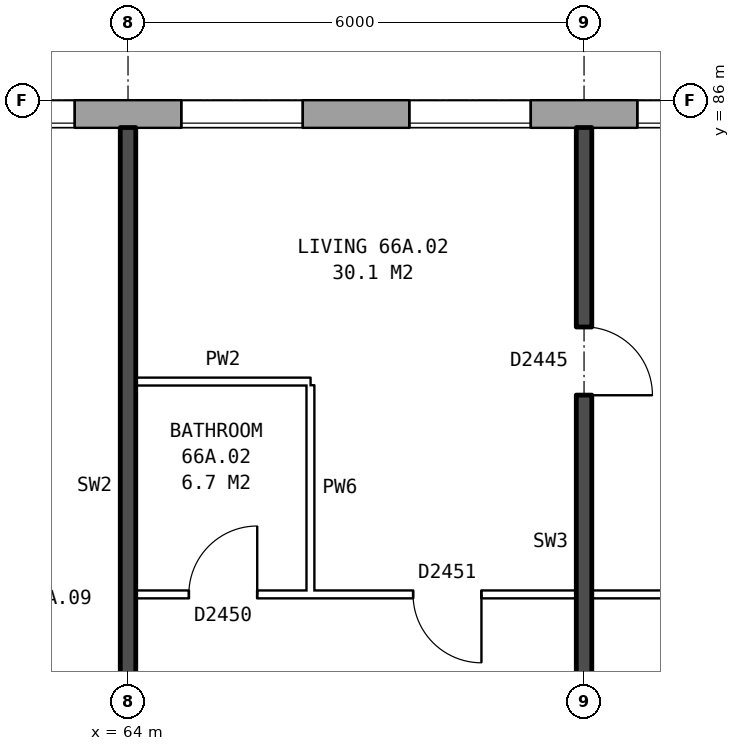
"""IFC4 building model, lengths in metres.
Left out: names, types, materials, properties, quantities, classifications, styles, units other than length and angle.
Written with IfcOpenShell. Run it as: python <this file> out.ifc"""

import sys

from ifc_helpers import new_model, si_unit, direction, frame, frame_2d, origin, place, context, subcontext, project, spatial, rectangle, extrude, element, fill, save


model = new_model("IFC4")
c1 = context("Model", 3, precision=1e-05, world=origin(), true_north=direction((0.0, 1.0)))
c2 = subcontext(c1, "Body", "Model", "MODEL_VIEW")
j1 = project(units=[si_unit("LENGTHUNIT", "METRE"), si_unit("PLANEANGLEUNIT", "RADIAN")], contexts=[c1])
p1 = place(None, origin())
s1 = spatial("IfcSite", under=j1, at=p1, CompositionType="ELEMENT")
p2 = place(p1, origin())
s2 = spatial("IfcBuilding", under=s1, at=p2, CompositionType="ELEMENT")
p3 = place(p2, frame((0.0, 0.0, 233.8)))
s3 = spatial("IfcBuildingStorey", under=s2, at=p3, CompositionType="ELEMENT", Elevation=233.8)
p4 = place(p3, frame((74.95, 85.82, 0.0), z_axis=(0.0, 0.0, 1.0), x_axis=(-1.0, 0.0, 0.0)))
e1 = element("IfcWall", 1, at=p4, inside=s3, PredefinedType="STANDARD", context=c2, shape_type="SweptSolid", body=[
    extrude(rectangle(XDim=39.875, YDim=0.36, at=frame_2d((19.938, 0.0))), origin(), (0.0, 0.0, 1.0), 2.85),
])
p5 = place(p4, frame((2.65, 0.0, 0.8)))
e2 = element("IfcOpeningElement", 2, at=p5, cuts=e1, PredefinedType="OPENING", context=c2, shape_type="SweptSolid", body=[
    extrude(rectangle(XDim=1.6, YDim=1.8, at=frame_2d((0.8, 0.9))), frame((0.0, 0.19, 0.0), z_axis=(0.0, -1.0, 0.0), x_axis=(1.0, 0.0, 0.0)), (0.0, 0.0, 1.0), 0.38),
])
p6 = place(p4, frame((5.65, 0.0, 0.8)))
e3 = element("IfcOpeningElement", 3, at=p6, cuts=e1, PredefinedType="OPENING", context=c2, shape_type="SweptSolid", body=[
    extrude(rectangle(XDim=1.6, YDim=1.8, at=frame_2d((0.8, 0.9))), frame((0.0, 0.19, 0.0), z_axis=(0.0, -1.0, 0.0), x_axis=(1.0, 0.0, 0.0)), (0.0, 0.0, 1.0), 0.38),
])
p7 = place(p4, frame((8.65, 0.0, 0.8)))
e4 = element("IfcOpeningElement", 4, at=p7, cuts=e1, PredefinedType="OPENING", context=c2, shape_type="SweptSolid", body=[
    extrude(rectangle(XDim=1.6, YDim=1.8, at=frame_2d((0.8, 0.9))), frame((0.0, 0.19, 0.0), z_axis=(0.0, -1.0, 0.0), x_axis=(1.0, 0.0, 0.0)), (0.0, 0.0, 1.0), 0.38),
])
p8 = place(p4, frame((11.65, 0.0, 0.8)))
e5 = element("IfcOpeningElement", 5, at=p8, cuts=e1, PredefinedType="OPENING", context=c2, shape_type="SweptSolid", body=[
    extrude(rectangle(XDim=1.6, YDim=1.8, at=frame_2d((0.8, 0.9))), frame((0.0, 0.19, 0.0), z_axis=(0.0, -1.0, 0.0), x_axis=(1.0, 0.0, 0.0)), (0.0, 0.0, 1.0), 0.38),
])
p9 = place(p4, frame((14.65, 0.0, 0.8)))
e6 = element("IfcOpeningElement", 6, at=p9, cuts=e1, PredefinedType="OPENING", context=c2, shape_type="SweptSolid", body=[
    extrude(rectangle(XDim=1.6, YDim=1.8, at=frame_2d((0.8, 0.9))), frame((0.0, 0.19, 0.0), z_axis=(0.0, -1.0, 0.0), x_axis=(1.0, 0.0, 0.0)), (0.0, 0.0, 1.0), 0.38),
])
p10 = place(p4, frame((17.65, 0.0, 0.8)))
e7 = element("IfcOpeningElement", 7, at=p10, cuts=e1, PredefinedType="OPENING", context=c2, shape_type="SweptSolid", body=[
    extrude(rectangle(XDim=1.6, YDim=1.8, at=frame_2d((0.8, 0.9))), frame((0.0, 0.19, 0.0), z_axis=(0.0, -1.0, 0.0), x_axis=(1.0, 0.0, 0.0)), (0.0, 0.0, 1.0), 0.38),
])
p11 = place(p4, frame((20.5, 0.0, 0.15)))
e8 = element("IfcOpeningElement", 8, at=p11, cuts=e1, PredefinedType="OPENING", context=c2, shape_type="SweptSolid", body=[
    extrude(rectangle(XDim=0.8, YDim=0.9, at=frame_2d((0.4, 0.45))), frame((0.0, 0.19, 0.0), z_axis=(0.0, -1.0, 0.0), x_axis=(1.0, 0.0, 0.0)), (0.0, 0.0, 1.0), 0.38),
])
p12 = place(p4, frame((23.65, 0.0, 0.8)))
e9 = element("IfcOpeningElement", 9, at=p12, cuts=e1, PredefinedType="OPENING", context=c2, shape_type="SweptSolid", body=[
    extrude(rectangle(XDim=1.6, YDim=1.8, at=frame_2d((0.8, 0.9))), frame((0.0, 0.19, 0.0), z_axis=(0.0, -1.0, 0.0), x_axis=(1.0, 0.0, 0.0)), (0.0, 0.0, 1.0), 0.38),
])
p13 = place(p4, frame((26.65, 0.0, 0.8)))
e10 = element("IfcOpeningElement", 10, at=p13, cuts=e1, PredefinedType="OPENING", context=c2, shape_type="SweptSolid", body=[
    extrude(rectangle(XDim=1.6, YDim=1.8, at=frame_2d((0.8, 0.9))), frame((0.0, 0.19, 0.0), z_axis=(0.0, -1.0, 0.0), x_axis=(1.0, 0.0, 0.0)), (0.0, 0.0, 1.0), 0.38),
])
p14 = place(p4, frame((29.65, 0.0, 0.8)))
e11 = element("IfcOpeningElement", 11, at=p14, cuts=e1, PredefinedType="OPENING", context=c2, shape_type="SweptSolid", body=[
    extrude(rectangle(XDim=1.6, YDim=1.8, at=frame_2d((0.8, 0.9))), frame((0.0, 0.19, 0.0), z_axis=(0.0, -1.0, 0.0), x_axis=(1.0, 0.0, 0.0)), (0.0, 0.0, 1.0), 0.38),
])
p15 = place(p4, frame((32.65, 0.0, 0.8)))
e12 = element("IfcOpeningElement", 12, at=p15, cuts=e1, PredefinedType="OPENING", context=c2, shape_type="SweptSolid", body=[
    extrude(rectangle(XDim=1.6, YDim=1.8, at=frame_2d((0.8, 0.9))), frame((0.0, 0.19, 0.0), z_axis=(0.0, -1.0, 0.0), x_axis=(1.0, 0.0, 0.0)), (0.0, 0.0, 1.0), 0.38),
])
p16 = place(p4, frame((35.65, 0.0, 0.8)))
e13 = element("IfcOpeningElement", 13, at=p16, cuts=e1, PredefinedType="OPENING", context=c2, shape_type="SweptSolid", body=[
    extrude(rectangle(XDim=1.6, YDim=1.8, at=frame_2d((0.8, 0.9))), frame((0.0, 0.19, 0.0), z_axis=(0.0, -1.0, 0.0), x_axis=(1.0, 0.0, 0.0)), (0.0, 0.0, 1.0), 0.38),
])
p17 = place(p3, frame((64.1, 79.5, 0.0), z_axis=(0.0, 0.0, 1.0), x_axis=(1.0, 0.0, 0.0)))
e14 = element("IfcWall", 14, at=p17, inside=s3, PredefinedType="PARTITIONING", context=c2, shape_type="SweptSolid", body=[
    extrude(rectangle(XDim=11.8, YDim=0.1, at=frame_2d((5.9, 0.0))), origin(), (0.0, 0.0, 1.0), 2.85),
])
p18 = place(p17, frame((3.65, 0.0, 0.0)))
e15 = element("IfcOpeningElement", 15, at=p18, cuts=e14, PredefinedType="OPENING", context=c2, shape_type="SweptSolid", body=[
    extrude(rectangle(XDim=0.9, YDim=2.1, at=frame_2d((0.45, 1.05))), frame((0.0, 0.06, 0.0), z_axis=(0.0, -1.0, 0.0), x_axis=(1.0, 0.0, 0.0)), (0.0, 0.0, 1.0), 0.12),
])
p19 = place(p17, frame((0.7, 0.0, 0.0)))
e16 = element("IfcOpeningElement", 16, at=p19, cuts=e14, PredefinedType="OPENING", context=c2, shape_type="SweptSolid", body=[
    extrude(rectangle(XDim=0.9, YDim=2.1, at=frame_2d((0.45, 1.05))), frame((0.0, 0.06, 0.0), z_axis=(0.0, -1.0, 0.0), x_axis=(1.0, 0.0, 0.0)), (0.0, 0.0, 1.0), 0.12),
])
p20 = place(p3, frame((64.1, 82.3, 0.0), z_axis=(0.0, 0.0, 1.0), x_axis=(1.0, 0.0, 0.0)))
e17 = element("IfcWall", 17, at=p20, inside=s3, PredefinedType="PARTITIONING", context=c2, shape_type="SweptSolid", body=[
    extrude(rectangle(XDim=2.3, YDim=0.1, at=frame_2d((1.15, 0.0))), origin(), (0.0, 0.0, 1.0), 2.85),
])
p21 = place(p3, frame((64.0, 76.2, 0.0), z_axis=(0.0, 0.0, 1.0), x_axis=(0.0, 1.0, 0.0)))
e18 = element("IfcWall", 18, at=p21, inside=s3, PredefinedType="SOLIDWALL", context=c2, shape_type="SweptSolid", body=[
    extrude(rectangle(XDim=9.44, YDim=0.2, at=frame_2d((4.72, 0.0))), origin(), (0.0, 0.0, 1.0), 2.85),
])
p22 = place(p3, frame((66.4, 79.55, 0.0), z_axis=(0.0, 0.0, 1.0), x_axis=(0.0, 1.0, 0.0)))
e19 = element("IfcWall", 19, at=p22, inside=s3, PredefinedType="PARTITIONING", context=c2, shape_type="SweptSolid", body=[
    extrude(rectangle(XDim=2.7, YDim=0.1, at=frame_2d((1.35, 0.0))), origin(), (0.0, 0.0, 1.0), 2.85),
])
p23 = place(p3, frame((70.0, 76.2, 0.0), z_axis=(0.0, 0.0, 1.0), x_axis=(0.0, 1.0, 0.0)))
e20 = element("IfcWall", 20, at=p23, inside=s3, PredefinedType="SOLIDWALL", context=c2, shape_type="SweptSolid", body=[
    extrude(rectangle(XDim=9.44, YDim=0.2, at=frame_2d((4.72, 0.0))), origin(), (0.0, 0.0, 1.0), 2.85),
])
p24 = place(p23, frame((5.92, 0.0, 0.0)))
e21 = element("IfcOpeningElement", 21, at=p24, cuts=e20, PredefinedType="OPENING", context=c2, shape_type="SweptSolid", body=[
    extrude(rectangle(XDim=0.9, YDim=2.1, at=frame_2d((0.45, 1.05))), frame((0.0, 0.11, 0.0), z_axis=(0.0, -1.0, 0.0), x_axis=(1.0, 0.0, 0.0)), (0.0, 0.0, 1.0), 0.22),
])
p25 = place(p23, frame((1.25, 0.0, 0.0)))
e22 = element("IfcOpeningElement", 22, at=p25, cuts=e20, PredefinedType="OPENING", context=c2, shape_type="SweptSolid", body=[
    extrude(rectangle(XDim=0.8, YDim=2.1, at=frame_2d((0.4, 1.05))), frame((0.0, 0.11, 0.0), z_axis=(0.0, -1.0, 0.0), x_axis=(1.0, 0.0, 0.0)), (0.0, 0.0, 1.0), 0.22),
])
p26 = place(p5, origin())
e23 = element("IfcWindow", 23, at=p26, inside=s3, PartitioningType="SINGLE_PANEL", PredefinedType="WINDOW", context=c2, shape_type="SweptSolid", body=[
    extrude(rectangle(XDim=1.6, YDim=1.8, at=frame_2d((0.8, 0.9))), frame((0.0, 0.15, 0.0), z_axis=(0.0, -1.0, 0.0), x_axis=(1.0, 0.0, 0.0)), (0.0, 0.0, 1.0), 0.06),
])
fill(e2, e23)
p27 = place(p6, origin())
e24 = element("IfcWindow", 24, at=p27, inside=s3, PartitioningType="SINGLE_PANEL", PredefinedType="WINDOW", context=c2, shape_type="SweptSolid", body=[
    extrude(rectangle(XDim=1.6, YDim=1.8, at=frame_2d((0.8, 0.9))), frame((0.0, 0.15, 0.0), z_axis=(0.0, -1.0, 0.0), x_axis=(1.0, 0.0, 0.0)), (0.0, 0.0, 1.0), 0.06),
])
fill(e3, e24)
p28 = place(p7, origin())
e25 = element("IfcWindow", 25, at=p28, inside=s3, PartitioningType="SINGLE_PANEL", PredefinedType="WINDOW", context=c2, shape_type="SweptSolid", body=[
    extrude(rectangle(XDim=1.6, YDim=1.8, at=frame_2d((0.8, 0.9))), frame((0.0, 0.15, 0.0), z_axis=(0.0, -1.0, 0.0), x_axis=(1.0, 0.0, 0.0)), (0.0, 0.0, 1.0), 0.06),
])
fill(e4, e25)
p29 = place(p8, origin())
e26 = element("IfcWindow", 26, at=p29, inside=s3, PartitioningType="SINGLE_PANEL", PredefinedType="WINDOW", context=c2, shape_type="SweptSolid", body=[
    extrude(rectangle(XDim=1.6, YDim=1.8, at=frame_2d((0.8, 0.9))), frame((0.0, 0.15, 0.0), z_axis=(0.0, -1.0, 0.0), x_axis=(1.0, 0.0, 0.0)), (0.0, 0.0, 1.0), 0.06),
])
fill(e5, e26)
p30 = place(p24, frame((0.9, 0.0, 0.0), z_axis=(0.0, 0.0, 1.0), x_axis=(-1.0, 0.0, 0.0)))
e27 = element("IfcDoor", 27, at=p30, inside=s3, OperationType="SINGLE_SWING_RIGHT", PredefinedType="DOOR", context=c2, shape_type="SweptSolid", body=[
    extrude(rectangle(XDim=0.9, YDim=2.1, at=frame_2d((0.45, 1.05))), frame((0.0, 0.025, 0.0), z_axis=(0.0, -1.0, 0.0), x_axis=(1.0, 0.0, 0.0)), (0.0, 0.0, 1.0), 0.05),
])
fill(e21, e27)
p31 = place(p18, frame((0.9, 0.0, 0.0), z_axis=(0.0, 0.0, 1.0), x_axis=(-1.0, 0.0, 0.0)))
e28 = element("IfcDoor", 28, at=p31, inside=s3, OperationType="SINGLE_SWING_LEFT", PredefinedType="DOOR", context=c2, shape_type="SweptSolid", body=[
    extrude(rectangle(XDim=0.9, YDim=2.1, at=frame_2d((0.45, 1.05))), frame((0.0, 0.025, 0.0), z_axis=(0.0, -1.0, 0.0), x_axis=(1.0, 0.0, 0.0)), (0.0, 0.0, 1.0), 0.05),
])
fill(e15, e28)
p32 = place(p19, origin())
e29 = element("IfcDoor", 29, at=p32, inside=s3, OperationType="SINGLE_SWING_RIGHT", PredefinedType="DOOR", context=c2, shape_type="SweptSolid", body=[
    extrude(rectangle(XDim=0.9, YDim=2.1, at=frame_2d((0.45, 1.05))), frame((0.0, 0.025, 0.0), z_axis=(0.0, -1.0, 0.0), x_axis=(1.0, 0.0, 0.0)), (0.0, 0.0, 1.0), 0.05),
])
fill(e16, e29)
save(model, sys.argv[1])
